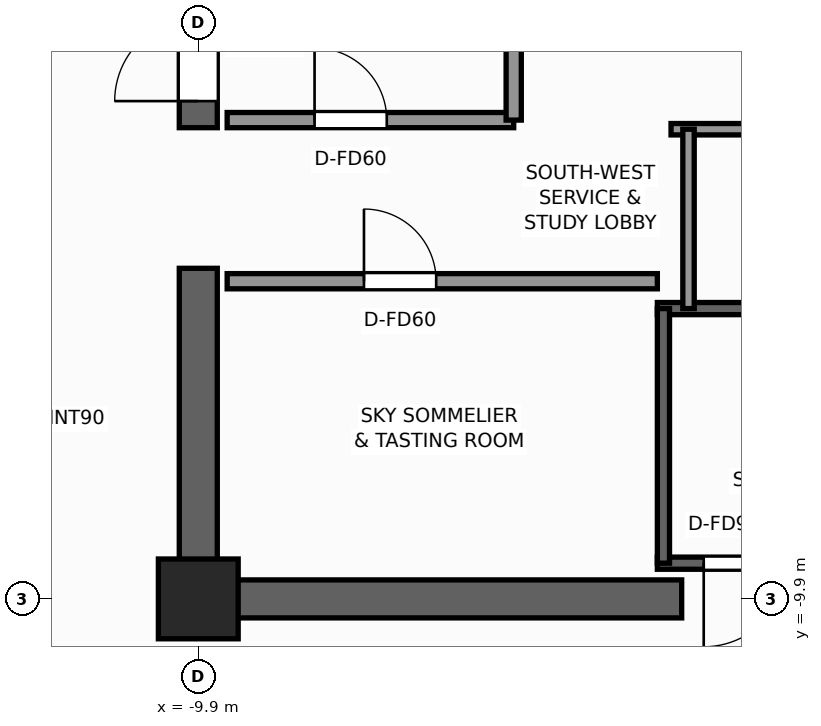
"""IFC4 building model, lengths in metres.
Left out: names, types, materials, properties, quantities, classifications, styles, units other than length and angle.
Written with IfcOpenShell. Run it as: python <this file> out.ifc"""

import sys

from ifc_helpers import new_model, si_unit, direction, frame, frame_2d, origin, origin_2d, place, context, subcontext, project, spatial, rectangle, extrude, element, fill, save


model = new_model("IFC4")
c1 = context("Model", 3, precision=1e-05, world=origin(), true_north=direction((0.0, 1.0)))
c2 = subcontext(c1, "Body", "Model", "MODEL_VIEW")
j1 = project(units=[si_unit("LENGTHUNIT", "METRE"), si_unit("PLANEANGLEUNIT", "RADIAN")], contexts=[c1])
p1 = place(None, origin())
s1 = spatial("IfcSite", under=j1, at=p1, CompositionType="ELEMENT")
p2 = place(p1, origin())
s2 = spatial("IfcBuilding", under=s1, at=p2, CompositionType="ELEMENT")
p3 = place(p2, frame((0.0, 0.0, 203.1)))
s3 = spatial("IfcBuildingStorey", under=s2, at=p3, CompositionType="ELEMENT", Elevation=203.1)
p4 = place(p3, frame((-3.54, -9.9, 0.0), z_axis=(0.0, 0.0, 1.0), x_axis=(-1.0, 0.0, 0.0)))
e1 = element("IfcWall", 1, at=p4, inside=s3, PredefinedType="SHEAR", context=c2, shape_type="SweptSolid", body=[
    extrude(rectangle(XDim=6.61, YDim=0.5, at=frame_2d((3.305, 0.0))), origin(), (0.0, 0.0, 1.0), 3.3),
])
p5 = place(p3, frame((-9.9, -9.65, 0.0), z_axis=(0.0, 0.0, 1.0), x_axis=(0.0, 1.0, 0.0)))
e2 = element("IfcWall", 2, at=p5, inside=s3, PredefinedType="SHEAR", context=c2, shape_type="SweptSolid", body=[
    extrude(rectangle(XDim=4.1, YDim=0.5, at=frame_2d((2.05, 0.0))), origin(), (0.0, 0.0, 1.0), 3.3),
])
p6 = place(p3, frame((-9.9, -3.7, 0.0), z_axis=(0.0, 0.0, 1.0), x_axis=(0.0, 1.0, 0.0)))
e3 = element("IfcWall", 3, at=p6, inside=s3, PredefinedType="SHEAR", context=c2, shape_type="SweptSolid", body=[
    extrude(rectangle(XDim=13.35, YDim=0.5, at=frame_2d((6.675, 0.0))), origin(), (0.0, 0.0, 1.0), 3.3),
])
p7 = place(p6, frame((0.35, 0.0, 0.0)))
e4 = element("IfcOpeningElement", 4, at=p7, cuts=e3, PredefinedType="OPENING", context=c2, shape_type="SweptSolid", body=[
    extrude(rectangle(XDim=1.1, YDim=2.2, at=frame_2d((0.55, 1.1))), frame((0.0, 0.26, 0.0), z_axis=(0.0, -1.0, 0.0), x_axis=(1.0, 0.0, 0.0)), (0.0, 0.0, 1.0), 0.52),
])
p8 = place(p3, frame((-9.9, -9.9, 0.0), z_axis=(0.0, 0.0, 1.0), x_axis=(1.0, 0.0, 0.0)))
e5 = element("IfcColumn", 5, at=p8, inside=s3, PredefinedType="COLUMN", context=c2, shape_type="SweptSolid", body=[
    extrude(rectangle(XDim=1.05, YDim=1.05, at=origin_2d()), origin(), (0.0, 0.0, 1.0), 3.3),
])
p9 = place(p3, frame((3.86, -9.43, 0.0), z_axis=(0.0, 0.0, 1.0), x_axis=(-1.0, 0.0, 0.0)))
e6 = element("IfcWall", 6, at=p9, inside=s3, PredefinedType="SHEAR", context=c2, shape_type="SweptSolid", body=[
    extrude(rectangle(XDim=7.72, YDim=0.16, at=frame_2d((3.86, 0.0))), origin(), (0.0, 0.0, 1.0), 3.3),
])
p10 = place(p9, frame((6.01, 0.0, 0.0)))
e7 = element("IfcOpeningElement", 7, at=p10, cuts=e6, PredefinedType="OPENING", context=c2, shape_type="SweptSolid", body=[
    extrude(rectangle(XDim=1.1, YDim=2.2, at=frame_2d((0.55, 1.1))), frame((0.0, 0.09, 0.0), z_axis=(0.0, -1.0, 0.0), x_axis=(1.0, 0.0, 0.0)), (0.0, 0.0, 1.0), 0.18),
])
p11 = place(p3, frame((-3.86, -6.08, 0.0), z_axis=(0.0, 0.0, 1.0), x_axis=(1.0, 0.0, 0.0)))
e8 = element("IfcWall", 8, at=p11, inside=s3, PredefinedType="SHEAR", context=c2, shape_type="SweptSolid", body=[
    extrude(rectangle(XDim=7.72, YDim=0.16, at=frame_2d((3.86, 0.0))), origin(), (0.0, 0.0, 1.0), 3.3),
])
p12 = place(p3, frame((-3.78, -9.43, 0.0), z_axis=(0.0, 0.0, 1.0), x_axis=(0.0, 1.0, 0.0)))
e9 = element("IfcWall", 9, at=p12, inside=s3, PredefinedType="SHEAR", context=c2, shape_type="SweptSolid", body=[
    extrude(rectangle(XDim=3.35, YDim=0.16, at=frame_2d((1.675, 0.0))), origin(), (0.0, 0.0, 1.0), 3.3),
])
p13 = place(p3, frame((-9.52, -3.6, 0.0), z_axis=(0.0, 0.0, 1.0), x_axis=(1.0, 0.0, 0.0)))
e10 = element("IfcWall", 10, at=p13, inside=s3, PredefinedType="SOLIDWALL", context=c2, shape_type="SweptSolid", body=[
    extrude(rectangle(XDim=3.77, YDim=0.2, at=frame_2d((1.885, 0.0))), origin(), (0.0, 0.0, 1.0), 3.08),
])
p14 = place(p13, frame((1.15, 0.0, 0.0)))
e11 = element("IfcOpeningElement", 11, at=p14, cuts=e10, PredefinedType="OPENING", context=c2, shape_type="SweptSolid", body=[
    extrude(rectangle(XDim=0.95, YDim=2.06, at=frame_2d((0.475, 1.03))), frame((0.0, 0.11, 0.0), z_axis=(0.0, -1.0, 0.0), x_axis=(1.0, 0.0, 0.0)), (0.0, 0.0, 1.0), 0.22),
])
p15 = place(p3, frame((-5.75, -3.6, 0.0), z_axis=(0.0, 0.0, 1.0), x_axis=(0.0, 1.0, 0.0)))
e12 = element("IfcWall", 12, at=p15, inside=s3, PredefinedType="SOLIDWALL", context=c2, shape_type="SweptSolid", body=[
    extrude(rectangle(XDim=5.57, YDim=0.2, at=frame_2d((2.785, 0.0))), origin(), (0.0, 0.0, 1.0), 3.08),
])
p16 = place(p15, frame((2.75, 0.0, 0.0)))
e13 = element("IfcOpeningElement", 13, at=p16, cuts=e12, PredefinedType="OPENING", context=c2, shape_type="SweptSolid", body=[
    extrude(rectangle(XDim=1.1, YDim=2.2, at=frame_2d((0.55, 1.1))), frame((0.0, 0.11, 0.0), z_axis=(0.0, -1.0, 0.0), x_axis=(1.0, 0.0, 0.0)), (0.0, 0.0, 1.0), 0.22),
])
p17 = place(p3, frame((-9.52, -5.72, 0.0), z_axis=(0.0, 0.0, 1.0), x_axis=(1.0, 0.0, 0.0)))
e14 = element("IfcWall", 14, at=p17, inside=s3, PredefinedType="SOLIDWALL", context=c2, shape_type="SweptSolid", body=[
    extrude(rectangle(XDim=5.66, YDim=0.2, at=frame_2d((2.83, 0.0))), origin(), (0.0, 0.0, 1.0), 3.08),
])
p18 = place(p17, frame((1.8, 0.0, 0.0)))
e15 = element("IfcOpeningElement", 15, at=p18, cuts=e14, PredefinedType="OPENING", context=c2, shape_type="SweptSolid", body=[
    extrude(rectangle(XDim=0.95, YDim=2.06, at=frame_2d((0.475, 1.03))), frame((0.0, 0.11, 0.0), z_axis=(0.0, -1.0, 0.0), x_axis=(1.0, 0.0, 0.0)), (0.0, 0.0, 1.0), 0.22),
])
p19 = place(p3, frame((-3.68, -3.72, 0.0), z_axis=(0.0, 0.0, 1.0), x_axis=(1.0, 0.0, 0.0)))
e16 = element("IfcWall", 16, at=p19, inside=s3, PredefinedType="PARTITIONING", context=c2, shape_type="SweptSolid", body=[
    extrude(rectangle(XDim=7.36, YDim=0.15, at=frame_2d((3.68, 0.0))), origin(), (0.0, 0.0, 1.0), 3.08),
])
p20 = place(p3, frame((-3.45, -6.08, 0.0), z_axis=(0.0, 0.0, 1.0), x_axis=(0.0, 1.0, 0.0)))
e17 = element("IfcWall", 17, at=p20, inside=s3, PredefinedType="PARTITIONING", context=c2, shape_type="SweptSolid", body=[
    extrude(rectangle(XDim=2.36, YDim=0.15, at=frame_2d((1.18, 0.0))), origin(), (0.0, 0.0, 1.0), 3.08),
])
p21 = place(p10, origin())
e18 = element("IfcDoor", 18, at=p21, inside=s3, OperationType="SINGLE_SWING_RIGHT", PredefinedType="DOOR", context=c2, shape_type="SweptSolid", body=[
    extrude(rectangle(XDim=1.1, YDim=2.2, at=frame_2d((0.55, 1.1))), frame((0.0, 0.025, 0.0), z_axis=(0.0, -1.0, 0.0), x_axis=(1.0, 0.0, 0.0)), (0.0, 0.0, 1.0), 0.05),
])
fill(e7, e18)
p22 = place(p7, origin())
e19 = element("IfcDoor", 19, at=p22, inside=s3, OperationType="SINGLE_SWING_LEFT", PredefinedType="DOOR", context=c2, shape_type="SweptSolid", body=[
    extrude(rectangle(XDim=1.1, YDim=2.2, at=frame_2d((0.55, 1.1))), frame((0.0, 0.025, 0.0), z_axis=(0.0, -1.0, 0.0), x_axis=(1.0, 0.0, 0.0)), (0.0, 0.0, 1.0), 0.05),
])
fill(e4, e19)
p23 = place(p18, origin())
e20 = element("IfcDoor", 20, at=p23, inside=s3, OperationType="SINGLE_SWING_LEFT", PredefinedType="DOOR", context=c2, shape_type="SweptSolid", body=[
    extrude(rectangle(XDim=0.95, YDim=2.06, at=frame_2d((0.475, 1.03))), frame((0.0, 0.025, 0.0), z_axis=(0.0, -1.0, 0.0), x_axis=(1.0, 0.0, 0.0)), (0.0, 0.0, 1.0), 0.05),
])
fill(e15, e20)
p24 = place(p14, origin())
e21 = element("IfcDoor", 21, at=p24, inside=s3, OperationType="SINGLE_SWING_LEFT", PredefinedType="DOOR", context=c2, shape_type="SweptSolid", body=[
    extrude(rectangle(XDim=0.95, YDim=2.06, at=frame_2d((0.475, 1.03))), frame((0.0, 0.025, 0.0), z_axis=(0.0, -1.0, 0.0), x_axis=(1.0, 0.0, 0.0)), (0.0, 0.0, 1.0), 0.05),
])
fill(e11, e21)
save(model, sys.argv[1])
